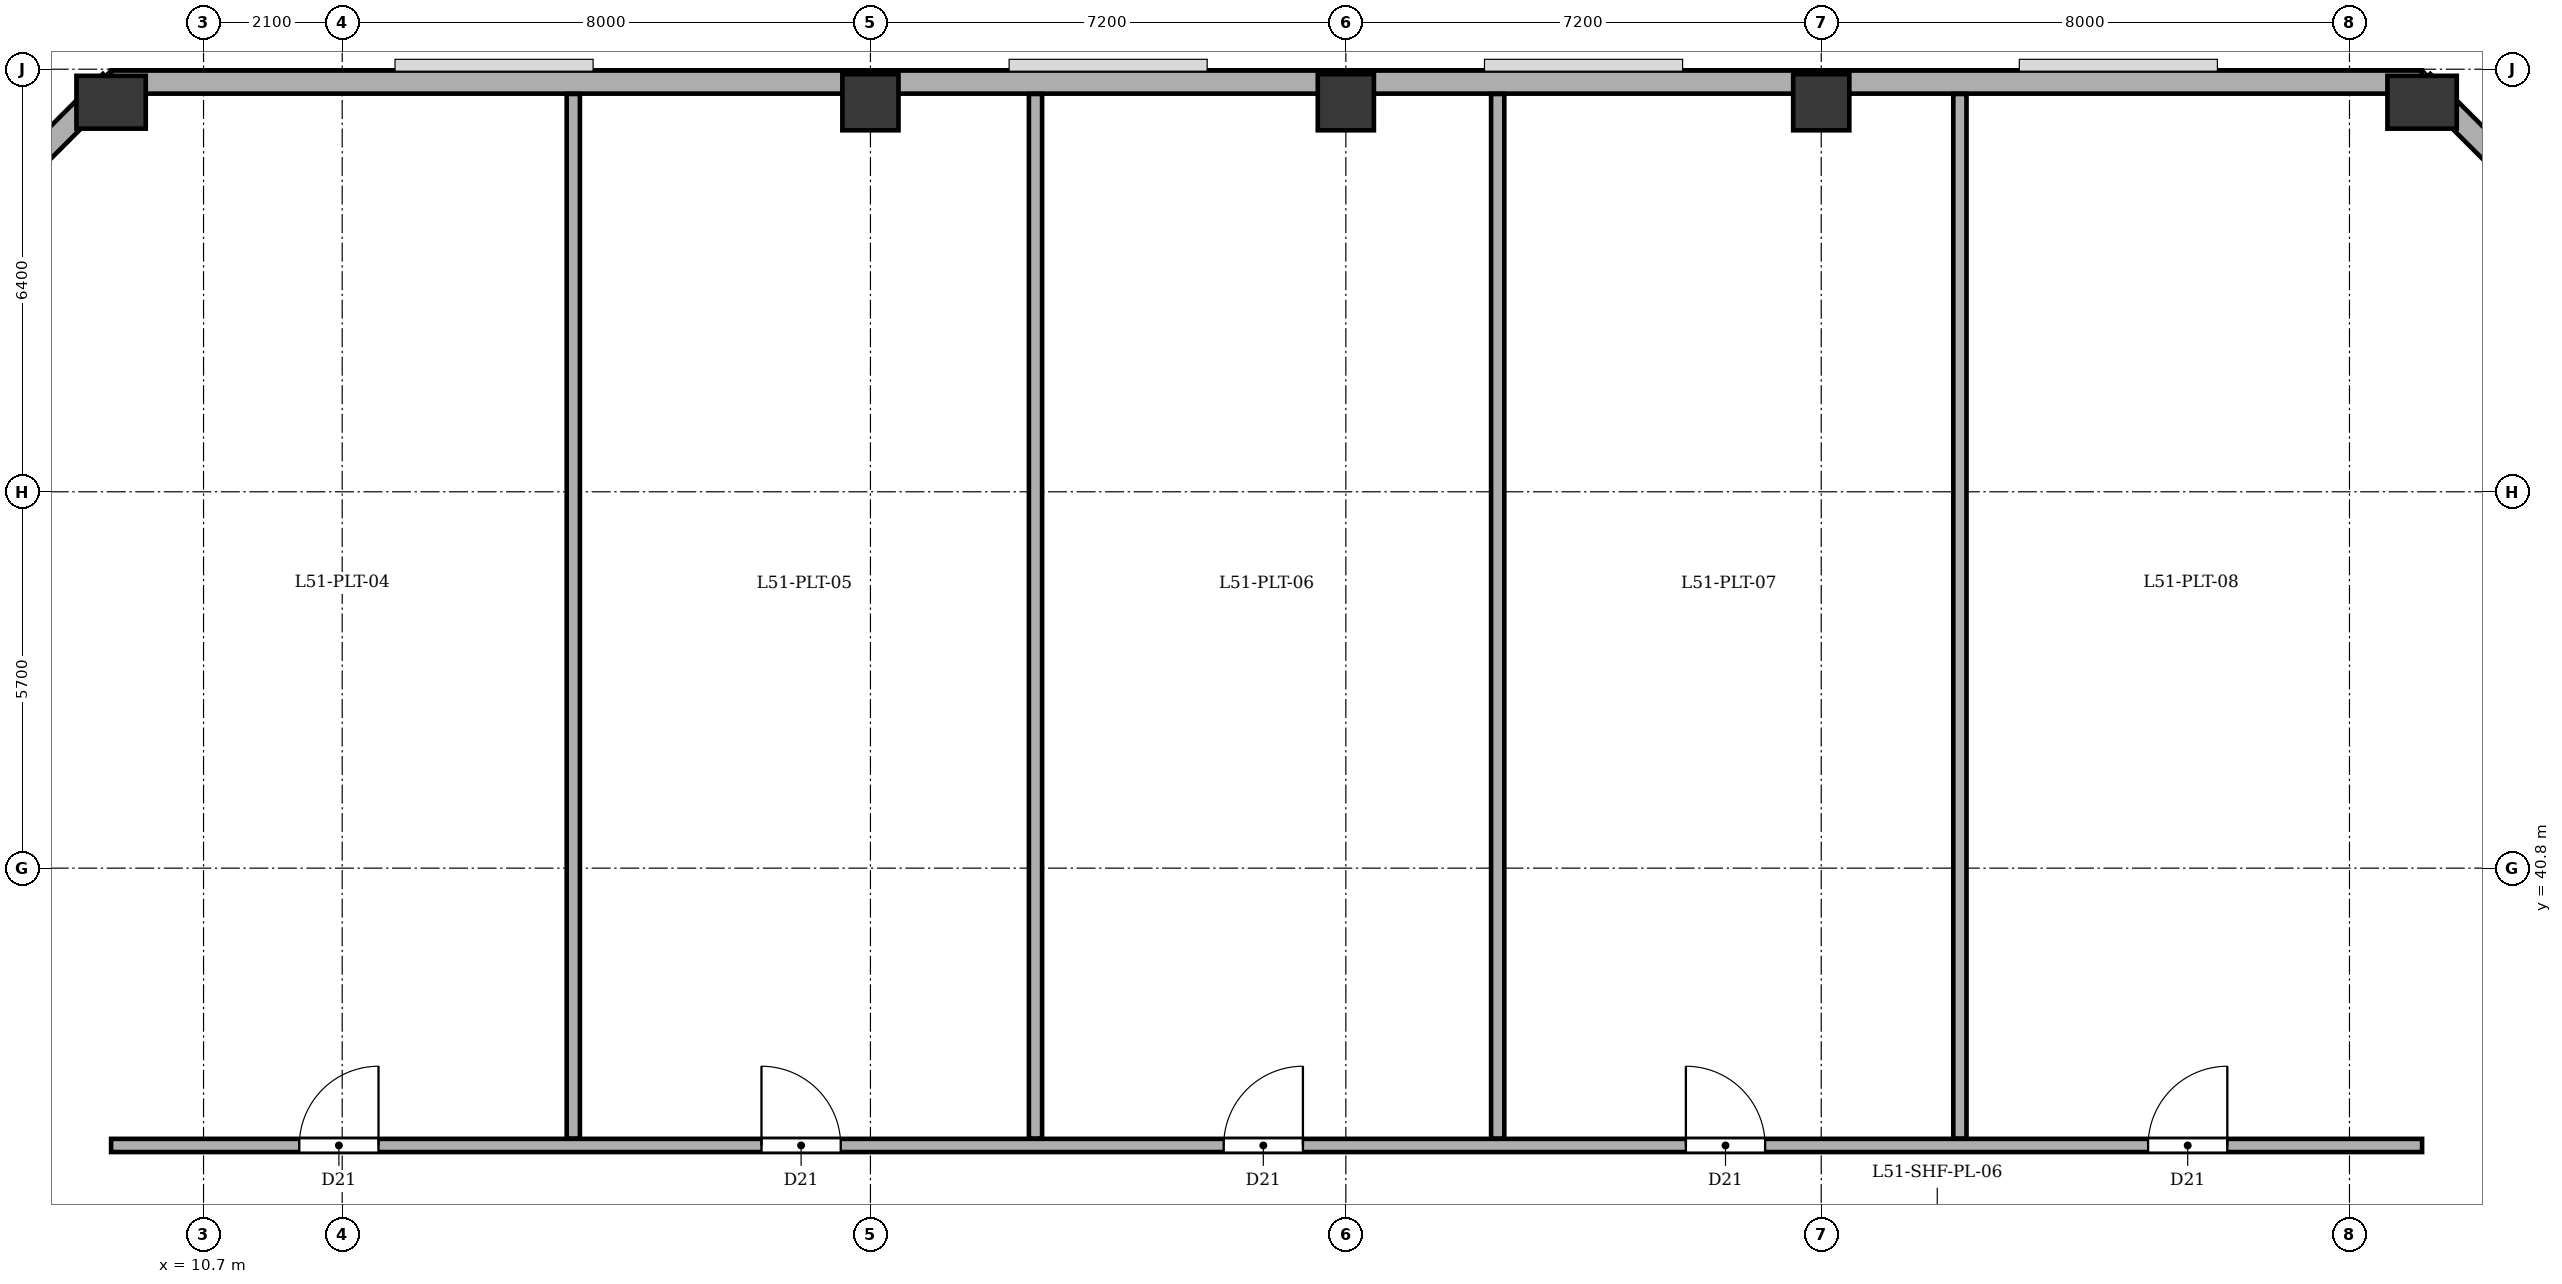
"""IFC4 building model, lengths in metres.
Left out: names, types, materials, properties, quantities, classifications, styles, units other than length and angle.
Written with IfcOpenShell. Run it as: python <this file> out.ifc"""

import sys

from ifc_helpers import new_model, si_unit, direction, frame, frame_2d, origin, origin_2d, place, context, subcontext, project, spatial, rectangle, extrude, element, fill, save


model = new_model("IFC4")
c1 = context("Model", 3, precision=1e-05, world=origin(), true_north=direction((0.0, 1.0)))
c2 = subcontext(c1, "Body", "Model", "MODEL_VIEW")
j1 = project(units=[si_unit("LENGTHUNIT", "METRE"), si_unit("PLANEANGLEUNIT", "RADIAN")], contexts=[c1])
p1 = place(None, origin())
s1 = spatial("IfcSite", under=j1, at=p1, CompositionType="ELEMENT")
p2 = place(p1, origin())
s2 = spatial("IfcBuilding", under=s1, at=p2, CompositionType="ELEMENT")
p3 = place(p2, frame((0.0, 0.0, 197.3)))
s3 = spatial("IfcBuildingStorey", under=s2, at=p3, CompositionType="ELEMENT", Elevation=197.3)
p4 = place(p3, frame((9.3, 52.4, 0.0), z_axis=(0.0, 0.0, 1.0), x_axis=(1.0, 0.0, 0.0)))
e1 = element("IfcColumn", 1, at=p4, inside=s3, PredefinedType="COLUMN", context=c2, shape_type="SweptSolid", body=[
    extrude(rectangle(XDim=0.8, YDim=1.05, at=origin_2d()), origin(), (0.0, 0.0, 1.0), 5.4),
])
for number, where, z_axis, x_axis in (
    (2, (20.8, 52.4, 0.0), (0.0, 0.0, 1.0), (1.0, 0.0, 0.0)),
    (3, (28.0, 52.4, 0.0), (0.0, 0.0, 1.0), (1.0, 0.0, 0.0)),
    (4, (35.2, 52.4, 0.0), (0.0, 0.0, 1.0), (1.0, 0.0, 0.0)),
):
    element("IfcColumn", number, at=place(p3, frame(where, z_axis=z_axis, x_axis=x_axis)), inside=s3, PredefinedType="COLUMN", context=c2, shape_type="SweptSolid", body=[
        extrude(rectangle(XDim=0.85, YDim=0.85, at=origin_2d()), origin(), (0.0, 0.0, 1.0), 5.4),
    ])
p5 = place(p3, frame((44.3, 52.4, 0.0), z_axis=(0.0, 0.0, 1.0), x_axis=(1.0, 0.0, 0.0)))
e5 = element("IfcColumn", 5, at=p5, inside=s3, PredefinedType="COLUMN", context=c2, shape_type="SweptSolid", body=[
    extrude(rectangle(XDim=0.8, YDim=1.05, at=origin_2d()), origin(), (0.0, 0.0, 1.0), 5.4),
])
p6 = place(p3, frame((4.495, 47.9, 0.0), z_axis=(0.0, 0.0, 1.0), x_axis=(0.707088817216, 0.7071247447, 0.0)))
e6 = element("IfcWall", 6, at=p6, inside=s3, PredefinedType="STANDARD", context=c2, shape_type="SweptSolid", body=[
    extrude(rectangle(XDim=6.795, YDim=0.35, at=frame_2d((3.398, 0.0))), origin(), (0.0, 0.0, 1.0), 4.625),
])
p7 = place(p3, frame((9.3, 52.705, 0.0), z_axis=(0.0, 0.0, 1.0), x_axis=(1.0, 0.0, 0.0)))
e7 = element("IfcWall", 7, at=p7, inside=s3, PredefinedType="STANDARD", context=c2, shape_type="SweptSolid", body=[
    extrude(rectangle(XDim=35.0, YDim=0.35, at=frame_2d((17.5, 0.0))), origin(), (0.0, 0.0, 1.0), 4.625),
])
p8 = place(p3, frame((44.3, 52.705, 0.0), z_axis=(0.0, 0.0, 1.0), x_axis=(0.707088817216, -0.7071247447, 0.0)))
e8 = element("IfcWall", 8, at=p8, inside=s3, PredefinedType="STANDARD", context=c2, shape_type="SweptSolid", body=[
    extrude(rectangle(XDim=6.795, YDim=0.35, at=frame_2d((3.398, 0.0))), origin(), (0.0, 0.0, 1.0), 4.625),
])
p9 = place(p3, frame((9.3, 36.6, 0.0), z_axis=(0.0, 0.0, 1.0), x_axis=(1.0, 0.0, 0.0)))
e9 = element("IfcWall", 9, at=p9, inside=s3, PredefinedType="SOLIDWALL", context=c2, shape_type="SweptSolid", body=[
    extrude(rectangle(XDim=35.0, YDim=0.2, at=frame_2d((17.5, 0.0))), origin(), (0.0, 0.0, 1.0), 5.04),
])
p10 = place(p9, frame((2.85, 0.0, 0.0)))
e10 = element("IfcOpeningElement", 10, at=p10, cuts=e9, PredefinedType="OPENING", context=c2, shape_type="SweptSolid", body=[
    extrude(rectangle(XDim=1.2, YDim=2.15, at=frame_2d((0.6, 1.075))), frame((0.0, 0.11, 0.0), z_axis=(0.0, -1.0, 0.0), x_axis=(1.0, 0.0, 0.0)), (0.0, 0.0, 1.0), 0.22),
])
p11 = place(p9, frame((9.85, 0.0, 0.0)))
e11 = element("IfcOpeningElement", 11, at=p11, cuts=e9, PredefinedType="OPENING", context=c2, shape_type="SweptSolid", body=[
    extrude(rectangle(XDim=1.2, YDim=2.15, at=frame_2d((0.6, 1.075))), frame((0.0, 0.11, 0.0), z_axis=(0.0, -1.0, 0.0), x_axis=(1.0, 0.0, 0.0)), (0.0, 0.0, 1.0), 0.22),
])
p12 = place(p9, frame((16.85, 0.0, 0.0)))
e12 = element("IfcOpeningElement", 12, at=p12, cuts=e9, PredefinedType="OPENING", context=c2, shape_type="SweptSolid", body=[
    extrude(rectangle(XDim=1.2, YDim=2.15, at=frame_2d((0.6, 1.075))), frame((0.0, 0.11, 0.0), z_axis=(0.0, -1.0, 0.0), x_axis=(1.0, 0.0, 0.0)), (0.0, 0.0, 1.0), 0.22),
])
p13 = place(p9, frame((23.85, 0.0, 0.0)))
e13 = element("IfcOpeningElement", 13, at=p13, cuts=e9, PredefinedType="OPENING", context=c2, shape_type="SweptSolid", body=[
    extrude(rectangle(XDim=1.2, YDim=2.15, at=frame_2d((0.6, 1.075))), frame((0.0, 0.11, 0.0), z_axis=(0.0, -1.0, 0.0), x_axis=(1.0, 0.0, 0.0)), (0.0, 0.0, 1.0), 0.22),
])
p14 = place(p9, frame((30.85, 0.0, 0.0)))
e14 = element("IfcOpeningElement", 14, at=p14, cuts=e9, PredefinedType="OPENING", context=c2, shape_type="SweptSolid", body=[
    extrude(rectangle(XDim=1.2, YDim=2.15, at=frame_2d((0.6, 1.075))), frame((0.0, 0.11, 0.0), z_axis=(0.0, -1.0, 0.0), x_axis=(1.0, 0.0, 0.0)), (0.0, 0.0, 1.0), 0.22),
])
for number, where, z_axis, x_axis in (
    (15, (16.3, 36.705, 0.0), (0.0, 0.0, 1.0), (0.0, 1.0, 0.0)),
    (16, (23.3, 36.705, 0.0), (0.0, 0.0, 1.0), (0.0, 1.0, 0.0)),
    (17, (30.3, 36.705, 0.0), (0.0, 0.0, 1.0), (0.0, 1.0, 0.0)),
    (18, (37.3, 36.705, 0.0), (0.0, 0.0, 1.0), (0.0, 1.0, 0.0)),
):
    element("IfcWall", number, at=place(p3, frame(where, z_axis=z_axis, x_axis=x_axis)), inside=s3, PredefinedType="SOLIDWALL", context=c2, shape_type="SweptSolid", body=[
        extrude(rectangle(XDim=15.82, YDim=0.2, at=frame_2d((7.91, 0.0))), origin(), (0.0, 0.0, 1.0), 5.04),
    ])
p15 = place(p10, origin())
e19 = element("IfcDoor", 19, at=p15, inside=s3, OperationType="SINGLE_SWING_RIGHT", PredefinedType="DOOR", context=c2, shape_type="SweptSolid", body=[
    extrude(rectangle(XDim=1.2, YDim=2.15, at=frame_2d((0.6, 1.075))), frame((0.0, 0.025, 0.0), z_axis=(0.0, -1.0, 0.0), x_axis=(1.0, 0.0, 0.0)), (0.0, 0.0, 1.0), 0.05),
])
fill(e10, e19)
p16 = place(p11, origin())
e20 = element("IfcDoor", 20, at=p16, inside=s3, OperationType="SINGLE_SWING_LEFT", PredefinedType="DOOR", context=c2, shape_type="SweptSolid", body=[
    extrude(rectangle(XDim=1.2, YDim=2.15, at=frame_2d((0.6, 1.075))), frame((0.0, 0.025, 0.0), z_axis=(0.0, -1.0, 0.0), x_axis=(1.0, 0.0, 0.0)), (0.0, 0.0, 1.0), 0.05),
])
fill(e11, e20)
p17 = place(p12, origin())
e21 = element("IfcDoor", 21, at=p17, inside=s3, OperationType="SINGLE_SWING_RIGHT", PredefinedType="DOOR", context=c2, shape_type="SweptSolid", body=[
    extrude(rectangle(XDim=1.2, YDim=2.15, at=frame_2d((0.6, 1.075))), frame((0.0, 0.025, 0.0), z_axis=(0.0, -1.0, 0.0), x_axis=(1.0, 0.0, 0.0)), (0.0, 0.0, 1.0), 0.05),
])
fill(e12, e21)
p18 = place(p13, origin())
e22 = element("IfcDoor", 22, at=p18, inside=s3, OperationType="SINGLE_SWING_LEFT", PredefinedType="DOOR", context=c2, shape_type="SweptSolid", body=[
    extrude(rectangle(XDim=1.2, YDim=2.15, at=frame_2d((0.6, 1.075))), frame((0.0, 0.025, 0.0), z_axis=(0.0, -1.0, 0.0), x_axis=(1.0, 0.0, 0.0)), (0.0, 0.0, 1.0), 0.05),
])
fill(e13, e22)
p19 = place(p14, origin())
e23 = element("IfcDoor", 23, at=p19, inside=s3, OperationType="SINGLE_SWING_RIGHT", PredefinedType="DOOR", context=c2, shape_type="SweptSolid", body=[
    extrude(rectangle(XDim=1.2, YDim=2.15, at=frame_2d((0.6, 1.075))), frame((0.0, 0.025, 0.0), z_axis=(0.0, -1.0, 0.0), x_axis=(1.0, 0.0, 0.0)), (0.0, 0.0, 1.0), 0.05),
])
fill(e14, e23)
save(model, sys.argv[1])
